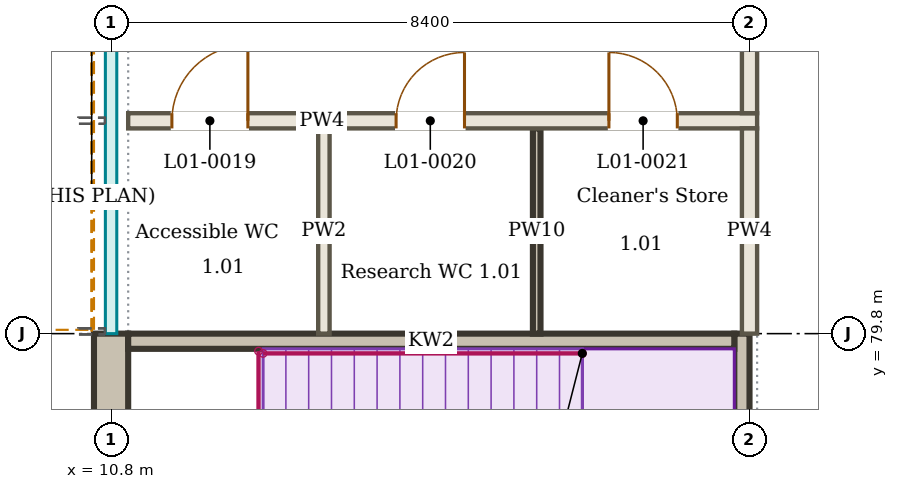
"""IFC4 building model, lengths in metres.
Left out: names, types, materials, properties, quantities, classifications, styles, units other than length and angle.
Written with IfcOpenShell. Run it as: python <this file> out.ifc"""

import sys

from ifc_helpers import new_model, si_unit, direction, frame, frame_2d, origin, place, context, subcontext, project, spatial, rectangle, extrude, element, fill, save


model = new_model("IFC4")
c1 = context("Model", 3, precision=1e-05, world=origin(), true_north=direction((0.0, 1.0)))
c2 = subcontext(c1, "Body", "Model", "MODEL_VIEW")
j1 = project(units=[si_unit("LENGTHUNIT", "METRE"), si_unit("PLANEANGLEUNIT", "RADIAN")], contexts=[c1])
p1 = place(None, origin())
s1 = spatial("IfcSite", under=j1, at=p1, CompositionType="ELEMENT")
p2 = place(p1, origin())
s2 = spatial("IfcBuilding", under=s1, at=p2, CompositionType="ELEMENT")
p3 = place(p2, frame((0.0, 0.0, 4.5)))
s3 = spatial("IfcBuildingStorey", under=s2, at=p3, CompositionType="ELEMENT", Elevation=4.5)
p4 = place(p3, frame((10.64, 79.8, 3.87), z_axis=(0.0, 0.0, 1.0), x_axis=(0.0, 1.0, 0.0)))
e1 = element("IfcWall", 1, at=p4, inside=s3, PredefinedType="SOLIDWALL", context=c2, shape_type="SweptSolid", body=[
    extrude(rectangle(XDim=8.4, YDim=0.13, at=frame_2d((4.2, 0.0))), origin(), (0.0, 0.0, 1.0), 0.63),
])
p5 = place(p3, frame((11.025, 82.6, 0.0), z_axis=(0.0, 0.0, 1.0), x_axis=(1.0, 0.0, 0.0)))
e2 = element("IfcWall", 2, at=p5, inside=s3, PredefinedType="PARTITIONING", context=c2, shape_type="SweptSolid", body=[
    extrude(rectangle(XDim=8.275, YDim=0.2, at=frame_2d((4.138, 0.0))), origin(), (0.0, 0.0, 1.0), 3.8),
])
p6 = place(p5, frame((0.575, 0.0, 0.0)))
e3 = element("IfcOpeningElement", 3, at=p6, cuts=e2, PredefinedType="OPENING", context=c2, shape_type="SweptSolid", body=[
    extrude(rectangle(XDim=1.0, YDim=2.1, at=frame_2d((0.5, 1.05))), frame((0.0, 0.11, 0.0), z_axis=(0.0, -1.0, 0.0), x_axis=(1.0, 0.0, 0.0)), (0.0, 0.0, 1.0), 0.22),
])
p7 = place(p5, frame((3.525, 0.0, 0.0)))
e4 = element("IfcOpeningElement", 4, at=p7, cuts=e2, PredefinedType="OPENING", context=c2, shape_type="SweptSolid", body=[
    extrude(rectangle(XDim=0.9, YDim=2.1, at=frame_2d((0.45, 1.05))), frame((0.0, 0.11, 0.0), z_axis=(0.0, -1.0, 0.0), x_axis=(1.0, 0.0, 0.0)), (0.0, 0.0, 1.0), 0.22),
])
p8 = place(p5, frame((6.325, 0.0, 0.0)))
e5 = element("IfcOpeningElement", 5, at=p8, cuts=e2, PredefinedType="OPENING", context=c2, shape_type="SweptSolid", body=[
    extrude(rectangle(XDim=0.9, YDim=2.1, at=frame_2d((0.45, 1.05))), frame((0.0, 0.11, 0.0), z_axis=(0.0, -1.0, 0.0), x_axis=(1.0, 0.0, 0.0)), (0.0, 0.0, 1.0), 0.22),
])
p9 = place(p3, frame((13.6, 79.8, 0.0), z_axis=(0.0, 0.0, 1.0), x_axis=(0.0, 1.0, 0.0)))
e6 = element("IfcWall", 6, at=p9, inside=s3, PredefinedType="PARTITIONING", context=c2, shape_type="SweptSolid", body=[
    extrude(rectangle(XDim=2.7, YDim=0.15, at=frame_2d((1.35, 0.0))), origin(), (0.0, 0.0, 1.0), 3.95),
])
p10 = place(p3, frame((16.4, 79.8, 0.0), z_axis=(0.0, 0.0, 1.0), x_axis=(0.0, 1.0, 0.0)))
e7 = element("IfcWall", 7, at=p10, inside=s3, PredefinedType="SOLIDWALL", context=c2, shape_type="SweptSolid", body=[
    extrude(rectangle(XDim=2.7, YDim=0.1, at=frame_2d((1.35, 0.0))), origin(), (0.0, 0.0, 1.0), 3.95),
])
p11 = place(p3, frame((19.2, 79.8, 0.0), z_axis=(0.0, 0.0, 1.0), x_axis=(0.0, 1.0, 0.0)))
e8 = element("IfcWall", 8, at=p11, inside=s3, PredefinedType="PARTITIONING", context=c2, shape_type="SweptSolid", body=[
    extrude(rectangle(XDim=2.7, YDim=0.2, at=frame_2d((1.35, 0.0))), origin(), (0.0, 0.0, 1.0), 3.8),
])
p12 = place(p3, frame((19.2, 82.7, 0.0), z_axis=(0.0, 0.0, 1.0), x_axis=(0.0, 1.0, 0.0)))
e9 = element("IfcWall", 9, at=p12, inside=s3, PredefinedType="PARTITIONING", context=c2, shape_type="SweptSolid", body=[
    extrude(rectangle(XDim=2.6, YDim=0.2, at=frame_2d((1.3, 0.0))), origin(), (0.0, 0.0, 1.0), 3.8),
])
p13 = place(p3, frame((19.1, 79.8, 0.0), z_axis=(0.0, 0.0, 1.0), x_axis=(0.0, -1.0, 0.0)))
e10 = element("IfcWall", 10, at=p13, inside=s3, PredefinedType="SOLIDWALL", context=c2, shape_type="SweptSolid", body=[
    extrude(rectangle(XDim=8.4, YDim=0.2, at=frame_2d((4.2, 0.0))), origin(), (0.0, 0.0, 1.0), 4.5),
])
p14 = place(p13, frame((4.725, 0.0, 0.0)))
e11 = element("IfcOpeningElement", 11, at=p14, cuts=e10, PredefinedType="OPENING", context=c2, shape_type="SweptSolid", body=[
    extrude(rectangle(XDim=1.3, YDim=2.1, at=frame_2d((0.65, 1.05))), frame((0.0, 0.11, 0.0), z_axis=(0.0, -1.0, 0.0), x_axis=(1.0, 0.0, 0.0)), (0.0, 0.0, 1.0), 0.22),
])
p15 = place(p3, frame((10.8, 79.8, 0.0), z_axis=(0.0, 0.0, 1.0), x_axis=(0.0, -1.0, 0.0)))
e12 = element("IfcWall", 12, at=p15, inside=s3, PredefinedType="SOLIDWALL", context=c2, shape_type="SweptSolid", body=[
    extrude(rectangle(XDim=8.4, YDim=0.45, at=frame_2d((4.2, 0.0))), origin(), (0.0, 0.0, 1.0), 4.5),
])
p16 = place(p3, frame((19.0, 79.7, 0.0), z_axis=(0.0, 0.0, 1.0), x_axis=(-1.0, 0.0, 0.0)))
e13 = element("IfcWall", 13, at=p16, inside=s3, PredefinedType="SOLIDWALL", context=c2, shape_type="SweptSolid", body=[
    extrude(rectangle(XDim=7.975, YDim=0.2, at=frame_2d((3.988, 0.0))), origin(), (0.0, 0.0, 1.0), 4.5),
])
p17 = place(p6, origin())
e14 = element("IfcDoor", 14, at=p17, inside=s3, OperationType="SINGLE_SWING_RIGHT", PredefinedType="DOOR", context=c2, shape_type="SweptSolid", body=[
    extrude(rectangle(XDim=1.0, YDim=2.1, at=frame_2d((0.5, 1.05))), frame((0.0, 0.025, 0.0), z_axis=(0.0, -1.0, 0.0), x_axis=(1.0, 0.0, 0.0)), (0.0, 0.0, 1.0), 0.05),
])
fill(e3, e14)
p18 = place(p7, origin())
e15 = element("IfcDoor", 15, at=p18, inside=s3, OperationType="SINGLE_SWING_RIGHT", PredefinedType="DOOR", context=c2, shape_type="SweptSolid", body=[
    extrude(rectangle(XDim=0.9, YDim=2.1, at=frame_2d((0.45, 1.05))), frame((0.0, 0.025, 0.0), z_axis=(0.0, -1.0, 0.0), x_axis=(1.0, 0.0, 0.0)), (0.0, 0.0, 1.0), 0.05),
])
fill(e4, e15)
p19 = place(p8, origin())
e16 = element("IfcDoor", 16, at=p19, inside=s3, OperationType="SINGLE_SWING_LEFT", PredefinedType="DOOR", context=c2, shape_type="SweptSolid", body=[
    extrude(rectangle(XDim=0.9, YDim=2.1, at=frame_2d((0.45, 1.05))), frame((0.0, 0.025, 0.0), z_axis=(0.0, -1.0, 0.0), x_axis=(1.0, 0.0, 0.0)), (0.0, 0.0, 1.0), 0.05),
])
fill(e5, e16)
save(model, sys.argv[1])
